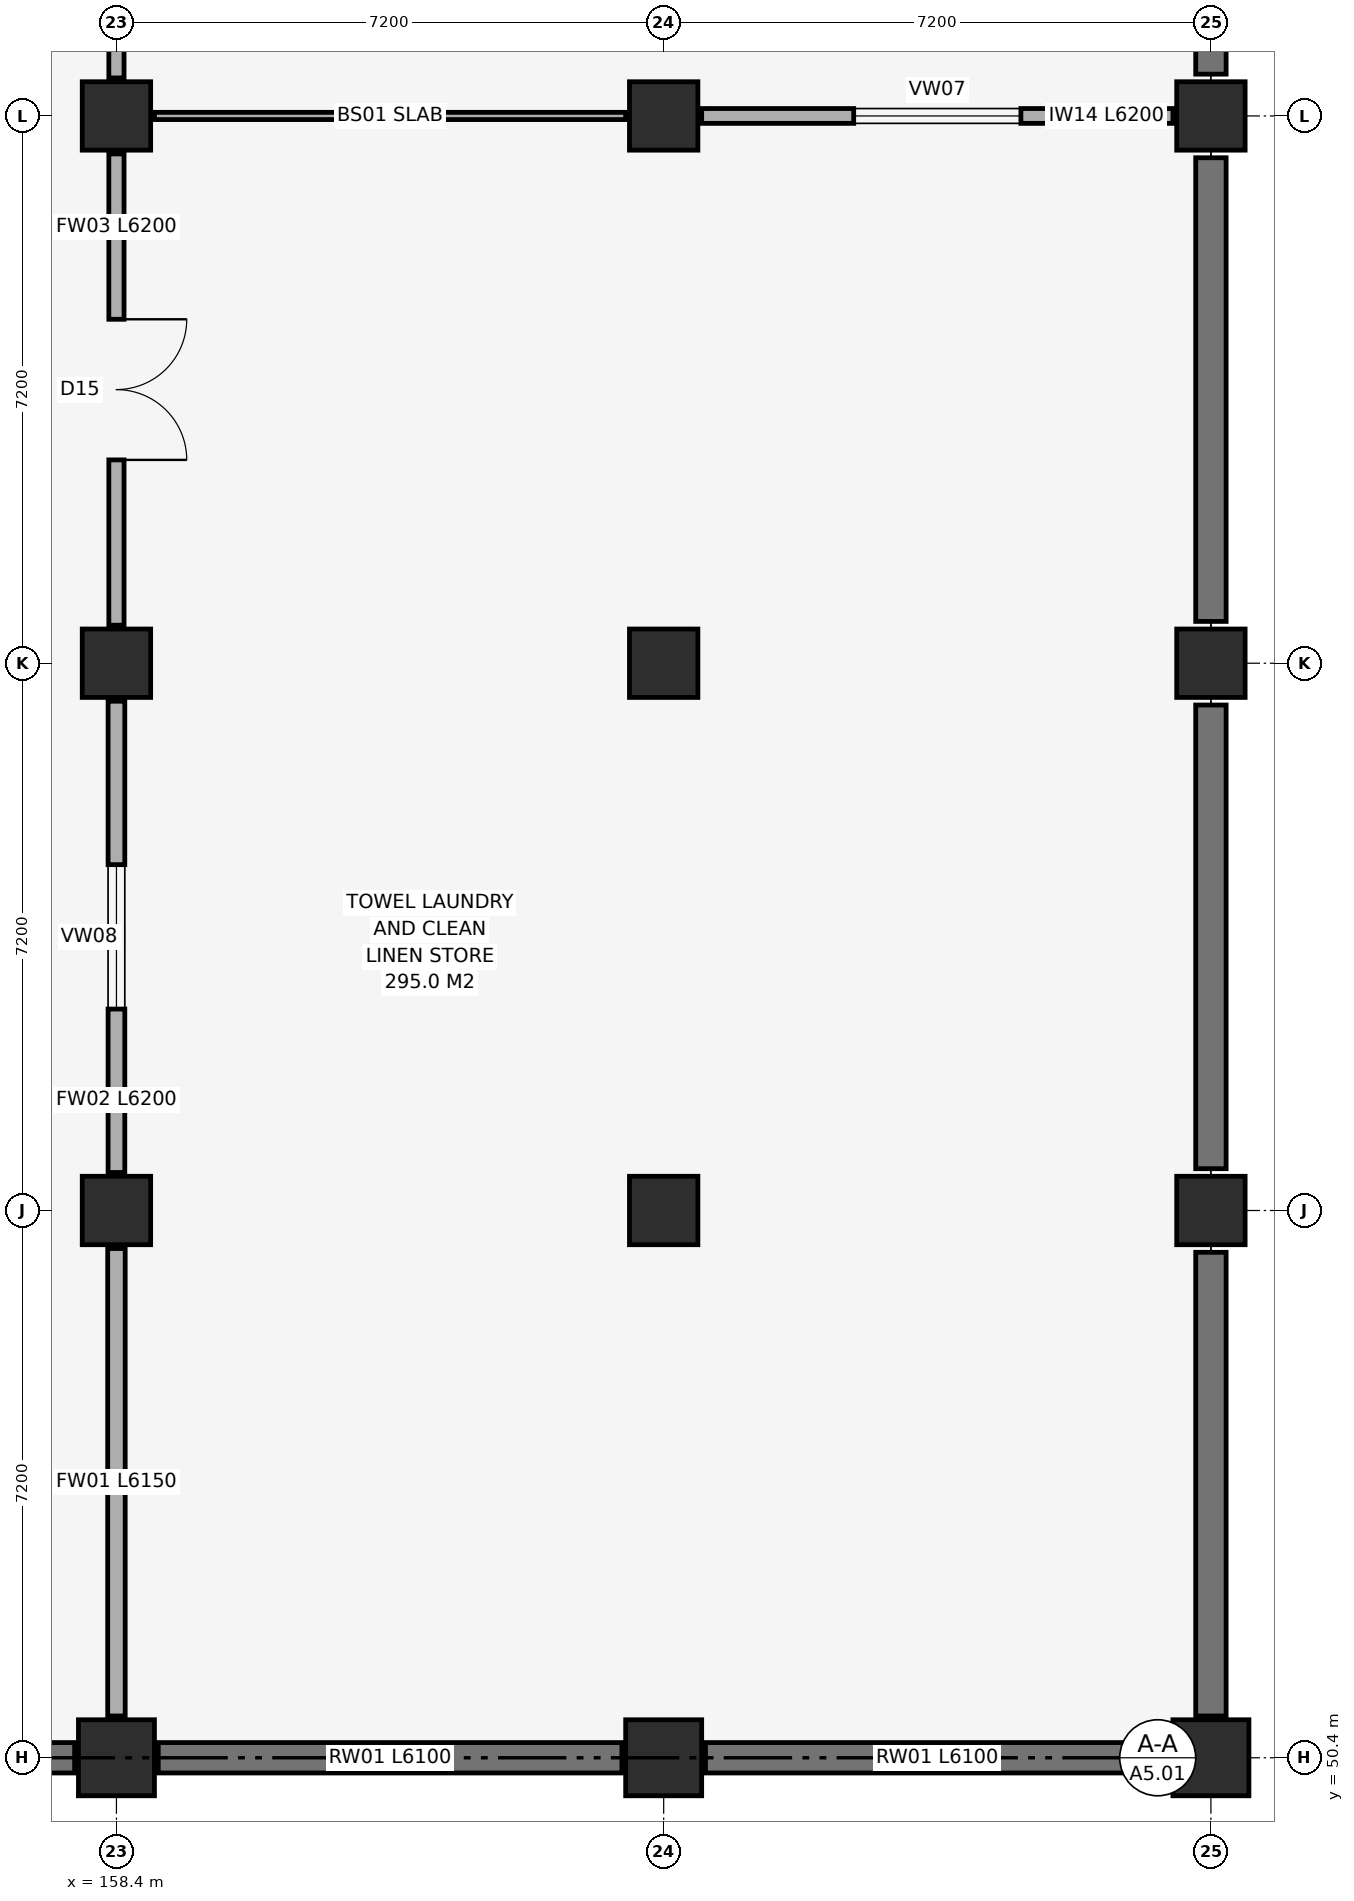
"""IFC4 building model, lengths in metres.
Left out: names, types, materials, properties, quantities, classifications, styles, units other than length and angle.
Written with IfcOpenShell. Run it as: python <this file> out.ifc"""

import sys

from ifc_helpers import new_model, si_unit, direction, frame, frame_2d, origin, origin_2d, place, context, subcontext, project, spatial, rectangle, extrude, element, fill, save


model = new_model("IFC4")
c1 = context("Model", 3, precision=1e-05, world=origin(), true_north=direction((0.0, 1.0)))
c2 = subcontext(c1, "Body", "Model", "MODEL_VIEW")
j1 = project(units=[si_unit("LENGTHUNIT", "METRE"), si_unit("PLANEANGLEUNIT", "RADIAN")], contexts=[c1])
p1 = place(None, origin())
s1 = spatial("IfcSite", under=j1, at=p1, CompositionType="ELEMENT")
p2 = place(p1, origin())
s2 = spatial("IfcBuilding", under=s1, at=p2, CompositionType="ELEMENT")
p3 = place(p2, frame((0.0, 0.0, -5.4)))
s3 = spatial("IfcBuildingStorey", under=s2, at=p3, CompositionType="ELEMENT", Elevation=-5.4)
p4 = place(p3, frame((158.4, 50.4, -0.45), z_axis=(0.0, 0.0, 1.0), x_axis=(1.0, 0.0, 0.0)))
e1 = element("IfcColumn", 1, at=p4, inside=s3, PredefinedType="COLUMN", context=c2, shape_type="SweptSolid", body=[
    extrude(rectangle(XDim=1.0, YDim=1.0, at=origin_2d()), origin(), (0.0, 0.0, 1.0), 5.85),
])
for number, where, z_axis, x_axis in (
    (2, (158.4, 57.6, -0.45), (0.0, 0.0, 1.0), (1.0, 0.0, 0.0)),
    (3, (158.4, 64.8, -0.45), (0.0, 0.0, 1.0), (1.0, 0.0, 0.0)),
    (4, (158.4, 72.0, -0.45), (0.0, 0.0, 1.0), (1.0, 0.0, 0.0)),
):
    element("IfcColumn", number, at=place(p3, frame(where, z_axis=z_axis, x_axis=x_axis)), inside=s3, PredefinedType="COLUMN", context=c2, shape_type="SweptSolid", body=[
        extrude(rectangle(XDim=0.9, YDim=0.9, at=origin_2d()), origin(), (0.0, 0.0, 1.0), 5.85),
    ])
p5 = place(p3, frame((165.6, 50.4, -0.45), z_axis=(0.0, 0.0, 1.0), x_axis=(1.0, 0.0, 0.0)))
e5 = element("IfcColumn", 5, at=p5, inside=s3, PredefinedType="COLUMN", context=c2, shape_type="SweptSolid", body=[
    extrude(rectangle(XDim=1.0, YDim=1.0, at=origin_2d()), origin(), (0.0, 0.0, 1.0), 5.85),
])
for number, where, z_axis, x_axis in (
    (6, (165.6, 57.6, -0.45), (0.0, 0.0, 1.0), (1.0, 0.0, 0.0)),
    (7, (165.6, 64.8, -0.45), (0.0, 0.0, 1.0), (1.0, 0.0, 0.0)),
    (8, (165.6, 72.0, -0.45), (0.0, 0.0, 1.0), (1.0, 0.0, 0.0)),
):
    element("IfcColumn", number, at=place(p3, frame(where, z_axis=z_axis, x_axis=x_axis)), inside=s3, PredefinedType="COLUMN", context=c2, shape_type="SweptSolid", body=[
        extrude(rectangle(XDim=0.9, YDim=0.9, at=origin_2d()), origin(), (0.0, 0.0, 1.0), 5.85),
    ])
p6 = place(p3, frame((172.8, 50.4, -0.45), z_axis=(0.0, 0.0, 1.0), x_axis=(1.0, 0.0, 0.0)))
e9 = element("IfcColumn", 9, at=p6, inside=s3, PredefinedType="COLUMN", context=c2, shape_type="SweptSolid", body=[
    extrude(rectangle(XDim=1.0, YDim=1.0, at=origin_2d()), origin(), (0.0, 0.0, 1.0), 5.85),
])
for number, where, z_axis, x_axis in (
    (10, (172.8, 57.6, -0.45), (0.0, 0.0, 1.0), (1.0, 0.0, 0.0)),
    (11, (172.8, 64.8, -0.45), (0.0, 0.0, 1.0), (1.0, 0.0, 0.0)),
    (12, (172.8, 72.0, -0.45), (0.0, 0.0, 1.0), (1.0, 0.0, 0.0)),
):
    element("IfcColumn", number, at=place(p3, frame(where, z_axis=z_axis, x_axis=x_axis)), inside=s3, PredefinedType="COLUMN", context=c2, shape_type="SweptSolid", body=[
        extrude(rectangle(XDim=0.9, YDim=0.9, at=origin_2d()), origin(), (0.0, 0.0, 1.0), 5.85),
    ])
for number, where, z_axis, x_axis in (
    (13, (151.75, 50.4, 0.0), (0.0, 0.0, 1.0), (1.0, 0.0, 0.0)),
    (14, (158.95, 50.4, 0.0), (0.0, 0.0, 1.0), (1.0, 0.0, 0.0)),
    (15, (166.15, 50.4, 0.0), (0.0, 0.0, 1.0), (1.0, 0.0, 0.0)),
    (16, (172.8, 50.95, 0.0), (0.0, 0.0, 1.0), (0.0, 1.0, 0.0)),
    (17, (172.8, 58.15, 0.0), (0.0, 0.0, 1.0), (0.0, 1.0, 0.0)),
):
    element("IfcWall", number, at=place(p3, frame(where, z_axis=z_axis, x_axis=x_axis)), inside=s3, PredefinedType="USERDEFINED", context=c2, shape_type="SweptSolid", body=[
        extrude(rectangle(XDim=6.1, YDim=0.4, at=frame_2d((3.05, 0.0))), origin(), (0.0, 0.0, 1.0), 5.12),
    ])
for number, where, z_axis, x_axis in (
    (18, (172.8, 65.35, 0.0), (0.0, 0.0, 1.0), (0.0, 1.0, 0.0)),
    (19, (172.8, 72.55, 0.0), (0.0, 0.0, 1.0), (0.0, 1.0, 0.0)),
):
    element("IfcWall", number, at=place(p3, frame(where, z_axis=z_axis, x_axis=x_axis)), inside=s3, PredefinedType="USERDEFINED", context=c2, shape_type="SweptSolid", body=[
        extrude(rectangle(XDim=6.1, YDim=0.4, at=frame_2d((3.05, 0.0))), origin(), (0.0, 0.0, 1.0), 5.12),
    ])
p7 = place(p3, frame((158.9, 72.0, 0.0), z_axis=(0.0, 0.0, 1.0), x_axis=(1.0, 0.0, 0.0)))
e20 = element("IfcWall", 20, at=p7, inside=s3, PredefinedType="PARTITIONING", context=c2, shape_type="SweptSolid", body=[
    extrude(rectangle(XDim=6.2, YDim=0.095, at=frame_2d((3.1, 0.0))), origin(), (0.0, 0.0, 1.0), 4.17),
])
p8 = place(p3, frame((166.1, 72.0, 0.0), z_axis=(0.0, 0.0, 1.0), x_axis=(1.0, 0.0, 0.0)))
e21 = element("IfcWall", 21, at=p8, inside=s3, PredefinedType="PARTITIONING", context=c2, shape_type="SweptSolid", body=[
    extrude(rectangle(XDim=6.2, YDim=0.195, at=frame_2d((3.1, 0.0))), origin(), (0.0, 0.0, 1.0), 5.12),
])
p9 = place(p8, frame((2.0, 0.0, 0.95)))
e22 = element("IfcOpeningElement", 22, at=p9, cuts=e21, PredefinedType="OPENING", context=c2, shape_type="SweptSolid", body=[
    extrude(rectangle(XDim=2.2, YDim=1.35, at=frame_2d((1.1, 0.675))), frame((0.0, 0.112, 0.0), z_axis=(0.0, -1.0, 0.0), x_axis=(1.0, 0.0, 0.0)), (0.0, 0.0, 1.0), 0.225),
])
p10 = place(p3, frame((158.4, 50.95, 0.0), z_axis=(0.0, 0.0, 1.0), x_axis=(0.0, 1.0, 0.0)))
e23 = element("IfcWall", 23, at=p10, inside=s3, PredefinedType="SOLIDWALL", context=c2, shape_type="SweptSolid", body=[
    extrude(rectangle(XDim=6.15, YDim=0.23, at=frame_2d((3.075, 0.0))), origin(), (0.0, 0.0, 1.0), 4.37),
])
p11 = place(p3, frame((158.4, 58.1, 0.0), z_axis=(0.0, 0.0, 1.0), x_axis=(0.0, 1.0, 0.0)))
e24 = element("IfcWall", 24, at=p11, inside=s3, PredefinedType="SOLIDWALL", context=c2, shape_type="SweptSolid", body=[
    extrude(rectangle(XDim=6.2, YDim=0.22, at=frame_2d((3.1, 0.0))), origin(), (0.0, 0.0, 1.0), 4.37),
])
p12 = place(p11, frame((2.15, 0.0, 0.95)))
e25 = element("IfcOpeningElement", 25, at=p12, cuts=e24, PredefinedType="OPENING", context=c2, shape_type="SweptSolid", body=[
    extrude(rectangle(XDim=1.9, YDim=1.35, at=frame_2d((0.95, 0.675))), frame((0.0, 0.125, 0.0), z_axis=(0.0, -1.0, 0.0), x_axis=(1.0, 0.0, 0.0)), (0.0, 0.0, 1.0), 0.25),
])
p13 = place(p3, frame((158.4, 65.3, 0.0), z_axis=(0.0, 0.0, 1.0), x_axis=(0.0, 1.0, 0.0)))
e26 = element("IfcWall", 26, at=p13, inside=s3, PredefinedType="SOLIDWALL", context=c2, shape_type="SweptSolid", body=[
    extrude(rectangle(XDim=6.2, YDim=0.2, at=frame_2d((3.1, 0.0))), origin(), (0.0, 0.0, 1.0), 4.37),
])
p14 = place(p13, frame((2.175, 0.0, 0.0)))
e27 = element("IfcOpeningElement", 27, at=p14, cuts=e26, PredefinedType="OPENING", context=c2, shape_type="SweptSolid", body=[
    extrude(rectangle(XDim=1.85, YDim=2.25, at=frame_2d((0.925, 1.125))), frame((0.0, 0.115, 0.0), z_axis=(0.0, -1.0, 0.0), x_axis=(1.0, 0.0, 0.0)), (0.0, 0.0, 1.0), 0.23),
])
p15 = place(p3, frame((158.4, 72.5, 0.0), z_axis=(0.0, 0.0, 1.0), x_axis=(0.0, 1.0, 0.0)))
e28 = element("IfcWall", 28, at=p15, inside=s3, PredefinedType="SOLIDWALL", context=c2, shape_type="SweptSolid", body=[
    extrude(rectangle(XDim=6.2, YDim=0.2, at=frame_2d((3.1, 0.0))), origin(), (0.0, 0.0, 1.0), 4.37),
])
p16 = place(p15, frame((2.6, 0.0, 0.0)))
e29 = element("IfcOpeningElement", 29, at=p16, cuts=e28, PredefinedType="OPENING", context=c2, shape_type="SweptSolid", body=[
    extrude(rectangle(XDim=1.0, YDim=2.1, at=frame_2d((0.5, 1.05))), frame((0.0, 0.115, 0.0), z_axis=(0.0, -1.0, 0.0), x_axis=(1.0, 0.0, 0.0)), (0.0, 0.0, 1.0), 0.23),
])
p17 = place(p9, origin())
e30 = element("IfcWindow", 30, at=p17, inside=s3, PartitioningType="SINGLE_PANEL", PredefinedType="WINDOW", context=c2, shape_type="SweptSolid", body=[
    extrude(rectangle(XDim=2.2, YDim=1.35, at=frame_2d((1.1, 0.675))), frame((0.0, 0.03, 0.0), z_axis=(0.0, -1.0, 0.0), x_axis=(1.0, 0.0, 0.0)), (0.0, 0.0, 1.0), 0.06),
])
fill(e22, e30)
p18 = place(p12, origin())
e31 = element("IfcWindow", 31, at=p18, inside=s3, PartitioningType="SINGLE_PANEL", PredefinedType="WINDOW", context=c2, shape_type="SweptSolid", body=[
    extrude(rectangle(XDim=1.9, YDim=1.35, at=frame_2d((0.95, 0.675))), frame((0.0, 0.03, 0.0), z_axis=(0.0, -1.0, 0.0), x_axis=(1.0, 0.0, 0.0)), (0.0, 0.0, 1.0), 0.06),
])
fill(e25, e31)
p19 = place(p14, frame((1.85, 0.0, 0.0), z_axis=(0.0, 0.0, 1.0), x_axis=(-1.0, 0.0, 0.0)))
e32 = element("IfcDoor", 32, at=p19, inside=s3, OperationType="DOUBLE_SWING_LEFT", PredefinedType="DOOR", context=c2, shape_type="SweptSolid", body=[
    extrude(rectangle(XDim=1.85, YDim=2.25, at=frame_2d((0.925, 1.125))), frame((0.0, 0.025, 0.0), z_axis=(0.0, -1.0, 0.0), x_axis=(1.0, 0.0, 0.0)), (0.0, 0.0, 1.0), 0.05),
])
fill(e27, e32)
save(model, sys.argv[1])
